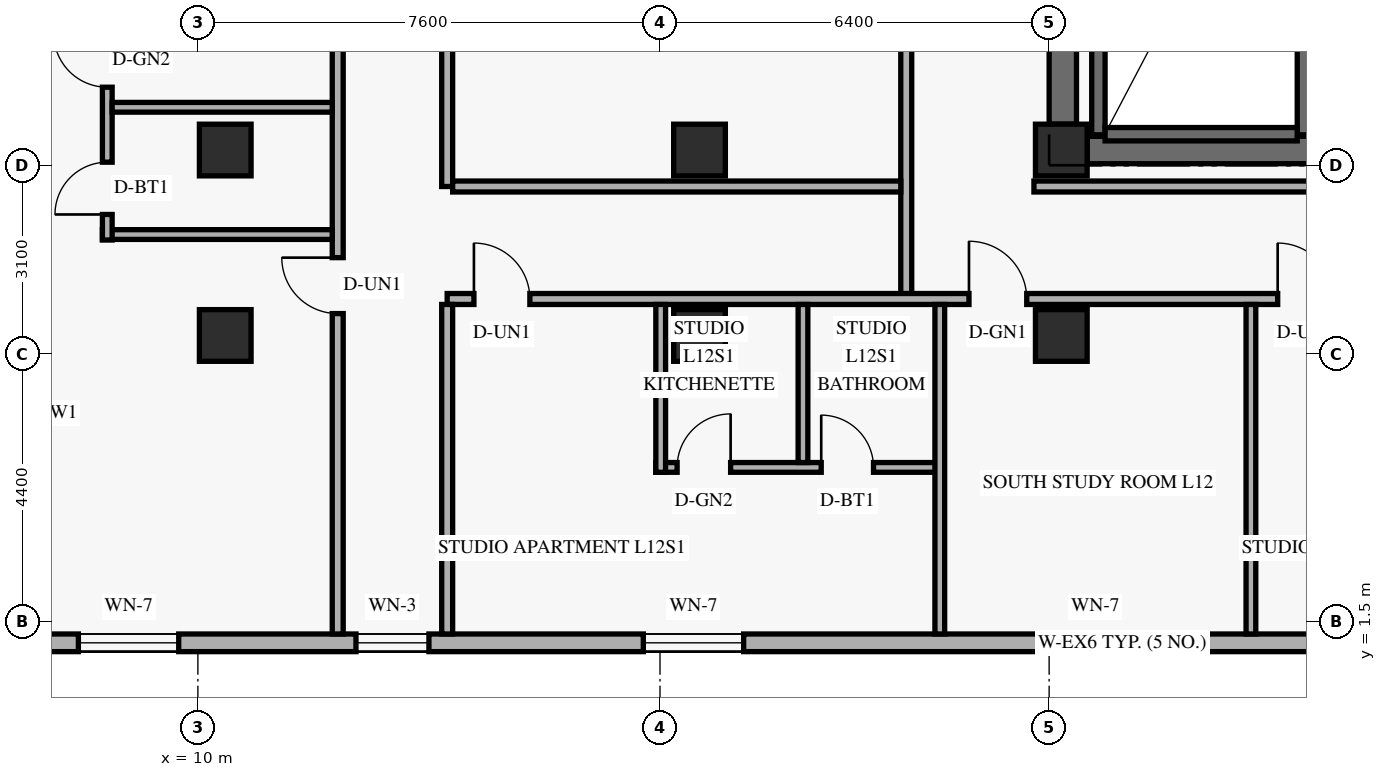
"""IFC4 building model, lengths in metres.
Left out: names, types, materials, properties, quantities, classifications, styles, units other than length and angle.
Written with IfcOpenShell. Run it as: python <this file> out.ifc"""

import sys

from ifc_helpers import new_model, si_unit, direction, frame, frame_2d, origin, origin_2d, place, context, subcontext, project, spatial, rectangle, extrude, element, fill, save


model = new_model("IFC4")
c1 = context("Model", 3, precision=1e-05, world=origin(), true_north=direction((0.0, 1.0)))
c2 = subcontext(c1, "Body", "Model", "MODEL_VIEW")
j1 = project(units=[si_unit("LENGTHUNIT", "METRE"), si_unit("PLANEANGLEUNIT", "RADIAN")], contexts=[c1])
p1 = place(None, origin())
s1 = spatial("IfcSite", under=j1, at=p1, CompositionType="ELEMENT")
p2 = place(p1, origin())
s2 = spatial("IfcBuilding", under=s1, at=p2, CompositionType="ELEMENT")
p3 = place(p2, frame((0.0, 0.0, 49.2)))
s3 = spatial("IfcBuildingStorey", under=s2, at=p3, CompositionType="ELEMENT", Elevation=49.2)
p4 = place(p3, frame((24.225, 9.675, 0.0), z_axis=(0.0, 0.0, 1.0), x_axis=(0.0, 1.0, 0.0)))
e1 = element("IfcWall", 1, at=p4, inside=s3, PredefinedType="SHEAR", context=c2, shape_type="SweptSolid", body=[
    extrude(rectangle(XDim=7.45, YDim=0.45, at=frame_2d((3.725, 0.0))), origin(), (0.0, 0.0, 1.0), 2.667),
])
p5 = place(p3, frame((24.625, 9.25, 0.0), z_axis=(0.0, 0.0, 1.0), x_axis=(1.0, 0.0, 0.0)))
e2 = element("IfcWall", 2, at=p5, inside=s3, PredefinedType="SHEAR", context=c2, shape_type="SweptSolid", body=[
    extrude(rectangle(XDim=10.15, YDim=0.45, at=frame_2d((5.075, 0.0))), origin(), (0.0, 0.0, 1.0), 3.36),
])
p6 = place(p3, frame((24.81, 9.5, 0.0), z_axis=(0.0, 0.0, 1.0), x_axis=(0.0, 1.0, 0.0)))
e3 = element("IfcWall", 3, at=p6, inside=s3, PredefinedType="SHEAR", context=c2, shape_type="SweptSolid", body=[
    extrude(rectangle(XDim=7.76, YDim=0.22, at=frame_2d((3.88, 0.0))), origin(), (0.0, 0.0, 1.0), 3.36),
])
p7 = place(p3, frame((28.23, 9.5, 0.0), z_axis=(0.0, 0.0, 1.0), x_axis=(0.0, 1.0, 0.0)))
e4 = element("IfcWall", 4, at=p7, inside=s3, PredefinedType="SHEAR", context=c2, shape_type="SweptSolid", body=[
    extrude(rectangle(XDim=7.76, YDim=0.3, at=frame_2d((3.88, 0.0))), origin(), (0.0, 0.0, 1.0), 3.36),
])
p8 = place(p3, frame((24.92, 9.51, 0.0), z_axis=(0.0, 0.0, 1.0), x_axis=(1.0, 0.0, 0.0)))
e5 = element("IfcWall", 5, at=p8, inside=s3, PredefinedType="SHEAR", context=c2, shape_type="SweptSolid", body=[
    extrude(rectangle(XDim=3.16, YDim=0.22, at=frame_2d((1.58, 0.0))), origin(), (0.0, 0.0, 1.0), 3.36),
])
for number, where, z_axis, x_axis in (
    (6, (10.45, 6.2, 0.0), (0.0, 0.0, 1.0), (1.0, 0.0, 0.0)),
    (7, (10.45, 9.25, 0.0), (0.0, 0.0, 1.0), (1.0, 0.0, 0.0)),
    (8, (18.25, 6.2, 0.0), (0.0, 0.0, 1.0), (1.0, 0.0, 0.0)),
    (9, (18.25, 9.25, 0.0), (0.0, 0.0, 1.0), (1.0, 0.0, 0.0)),
    (10, (24.2, 6.2, 0.0), (0.0, 0.0, 1.0), (1.0, 0.0, 0.0)),
    (11, (24.2, 9.25, 0.0), (0.0, 0.0, 1.0), (1.0, 0.0, 0.0)),
):
    element("IfcColumn", number, at=place(p3, frame(where, z_axis=z_axis, x_axis=x_axis)), inside=s3, PredefinedType="COLUMN", context=c2, shape_type="SweptSolid", body=[
        extrude(rectangle(XDim=0.85, YDim=0.85, at=origin_2d()), origin(), (0.0, 0.0, 1.0), 3.6),
    ])
p9 = place(p3, frame((5.42, 1.145, 0.0), z_axis=(0.0, 0.0, 1.0), x_axis=(1.0, 0.0, 0.0)))
e12 = element("IfcWall", 12, at=p9, inside=s3, PredefinedType="SOLIDWALL", context=c2, shape_type="SweptSolid", body=[
    extrude(rectangle(XDim=39.56, YDim=0.29, at=frame_2d((19.78, 0.0))), origin(), (0.0, 0.0, 1.0), 3.36),
])
p10 = place(p9, frame((2.615, 0.0, 0.85)))
e13 = element("IfcOpeningElement", 13, at=p10, cuts=e12, PredefinedType="OPENING", context=c2, shape_type="SweptSolid", body=[
    extrude(rectangle(XDim=1.65, YDim=1.6, at=frame_2d((0.825, 0.8))), frame((0.0, 0.155, 0.0), z_axis=(0.0, -1.0, 0.0), x_axis=(1.0, 0.0, 0.0)), (0.0, 0.0, 1.0), 0.31),
])
p11 = place(p9, frame((7.18, 0.0, 0.85)))
e14 = element("IfcOpeningElement", 14, at=p11, cuts=e12, PredefinedType="OPENING", context=c2, shape_type="SweptSolid", body=[
    extrude(rectangle(XDim=1.2, YDim=1.5, at=frame_2d((0.6, 0.75))), frame((0.0, 0.155, 0.0), z_axis=(0.0, -1.0, 0.0), x_axis=(1.0, 0.0, 0.0)), (0.0, 0.0, 1.0), 0.31),
])
p12 = place(p9, frame((11.906, 0.0, 0.85)))
e15 = element("IfcOpeningElement", 15, at=p12, cuts=e12, PredefinedType="OPENING", context=c2, shape_type="SweptSolid", body=[
    extrude(rectangle(XDim=1.65, YDim=1.6, at=frame_2d((0.825, 0.8))), frame((0.0, 0.155, 0.0), z_axis=(0.0, -1.0, 0.0), x_axis=(1.0, 0.0, 0.0)), (0.0, 0.0, 1.0), 0.31),
])
p13 = place(p9, frame((18.515, 0.0, 0.85)))
e16 = element("IfcOpeningElement", 16, at=p13, cuts=e12, PredefinedType="OPENING", context=c2, shape_type="SweptSolid", body=[
    extrude(rectangle(XDim=1.65, YDim=1.6, at=frame_2d((0.825, 0.8))), frame((0.0, 0.155, 0.0), z_axis=(0.0, -1.0, 0.0), x_axis=(1.0, 0.0, 0.0)), (0.0, 0.0, 1.0), 0.31),
])
p14 = place(p9, frame((25.124, 0.0, 0.85)))
e17 = element("IfcOpeningElement", 17, at=p14, cuts=e12, PredefinedType="OPENING", context=c2, shape_type="SweptSolid", body=[
    extrude(rectangle(XDim=1.65, YDim=1.6, at=frame_2d((0.825, 0.8))), frame((0.0, 0.155, 0.0), z_axis=(0.0, -1.0, 0.0), x_axis=(1.0, 0.0, 0.0)), (0.0, 0.0, 1.0), 0.31),
])
p15 = place(p9, frame((30.465, 0.0, 0.85)))
e18 = element("IfcOpeningElement", 18, at=p15, cuts=e12, PredefinedType="OPENING", context=c2, shape_type="SweptSolid", body=[
    extrude(rectangle(XDim=1.2, YDim=1.5, at=frame_2d((0.6, 0.75))), frame((0.0, 0.155, 0.0), z_axis=(0.0, -1.0, 0.0), x_axis=(1.0, 0.0, 0.0)), (0.0, 0.0, 1.0), 0.31),
])
p16 = place(p9, frame((32.613, 0.0, 0.85)))
e19 = element("IfcOpeningElement", 19, at=p16, cuts=e12, PredefinedType="OPENING", context=c2, shape_type="SweptSolid", body=[
    extrude(rectangle(XDim=1.65, YDim=1.6, at=frame_2d((0.825, 0.8))), frame((0.0, 0.155, 0.0), z_axis=(0.0, -1.0, 0.0), x_axis=(1.0, 0.0, 0.0)), (0.0, 0.0, 1.0), 0.31),
])
p17 = place(p9, frame((36.328, 0.0, 0.85)))
e20 = element("IfcOpeningElement", 20, at=p17, cuts=e12, PredefinedType="OPENING", context=c2, shape_type="SweptSolid", body=[
    extrude(rectangle(XDim=1.65, YDim=1.6, at=frame_2d((0.825, 0.8))), frame((0.0, 0.155, 0.0), z_axis=(0.0, -1.0, 0.0), x_axis=(1.0, 0.0, 0.0)), (0.0, 0.0, 1.0), 0.31),
])
p18 = place(p3, frame((21.65, 6.8, 0.0), z_axis=(0.0, 0.0, 1.0), x_axis=(0.0, 1.0, 0.0)))
e21 = element("IfcWall", 21, at=p18, inside=s3, PredefinedType="STANDARD", context=c2, shape_type="SweptSolid", body=[
    extrude(rectangle(XDim=34.4, YDim=0.18, at=frame_2d((17.2, 0.0))), origin(), (0.0, 0.0, 1.0), 2.649),
])
p19 = place(p3, frame((14.1, 6.8, 0.0), z_axis=(0.0, 0.0, 1.0), x_axis=(1.0, 0.0, 0.0)))
e22 = element("IfcWall", 22, at=p19, inside=s3, PredefinedType="STANDARD", context=c2, shape_type="SweptSolid", body=[
    extrude(rectangle(XDim=21.32, YDim=0.18, at=frame_2d((10.66, 0.0))), origin(), (0.0, 0.0, 1.0), 2.649),
])
p20 = place(p19, frame((0.44, 0.0, 0.0)))
e23 = element("IfcOpeningElement", 23, at=p20, cuts=e22, PredefinedType="OPENING", context=c2, shape_type="SweptSolid", body=[
    extrude(rectangle(XDim=0.92, YDim=2.15, at=frame_2d((0.46, 1.075))), frame((0.0, 0.1, 0.0), z_axis=(0.0, -1.0, 0.0), x_axis=(1.0, 0.0, 0.0)), (0.0, 0.0, 1.0), 0.2),
])
p21 = place(p19, frame((8.582, 0.0, 0.0)))
e24 = element("IfcOpeningElement", 24, at=p21, cuts=e22, PredefinedType="OPENING", context=c2, shape_type="SweptSolid", body=[
    extrude(rectangle(XDim=0.95, YDim=2.15, at=frame_2d((0.475, 1.075))), frame((0.0, 0.1, 0.0), z_axis=(0.0, -1.0, 0.0), x_axis=(1.0, 0.0, 0.0)), (0.0, 0.0, 1.0), 0.2),
])
p22 = place(p19, frame((13.658, 0.0, 0.0)))
e25 = element("IfcOpeningElement", 25, at=p22, cuts=e22, PredefinedType="OPENING", context=c2, shape_type="SweptSolid", body=[
    extrude(rectangle(XDim=0.92, YDim=2.15, at=frame_2d((0.46, 1.075))), frame((0.0, 0.1, 0.0), z_axis=(0.0, -1.0, 0.0), x_axis=(1.0, 0.0, 0.0)), (0.0, 0.0, 1.0), 0.2),
])
p23 = place(p3, frame((23.75, 8.65, 0.0), z_axis=(0.0, 0.0, 1.0), x_axis=(1.0, 0.0, 0.0)))
e26 = element("IfcWall", 26, at=p23, inside=s3, PredefinedType="STANDARD", context=c2, shape_type="SweptSolid", body=[
    extrude(rectangle(XDim=11.67, YDim=0.18, at=frame_2d((5.835, 0.0))), origin(), (0.0, 0.0, 1.0), 2.649),
])
p24 = place(p3, frame((12.3, 1.29, 0.0), z_axis=(0.0, 0.0, 1.0), x_axis=(0.0, 1.0, 0.0)))
e27 = element("IfcWall", 27, at=p24, inside=s3, PredefinedType="STANDARD", context=c2, shape_type="SweptSolid", body=[
    extrude(rectangle(XDim=45.42, YDim=0.18, at=frame_2d((22.71, 0.0))), origin(), (0.0, 0.0, 1.0), 2.649),
])
p25 = place(p24, frame((5.27, 0.0, 0.0)))
e28 = element("IfcOpeningElement", 28, at=p25, cuts=e27, PredefinedType="OPENING", context=c2, shape_type="SweptSolid", body=[
    extrude(rectangle(XDim=0.92, YDim=2.15, at=frame_2d((0.46, 1.075))), frame((0.0, 0.1, 0.0), z_axis=(0.0, -1.0, 0.0), x_axis=(1.0, 0.0, 0.0)), (0.0, 0.0, 1.0), 0.2),
])
p26 = place(p24, frame((16.21, 0.0, 0.0)))
e29 = element("IfcOpeningElement", 29, at=p26, cuts=e27, PredefinedType="OPENING", context=c2, shape_type="SweptSolid", body=[
    extrude(rectangle(XDim=0.92, YDim=2.15, at=frame_2d((0.46, 1.075))), frame((0.0, 0.1, 0.0), z_axis=(0.0, -1.0, 0.0), x_axis=(1.0, 0.0, 0.0)), (0.0, 0.0, 1.0), 0.2),
])
p27 = place(p24, frame((28.63, 0.0, 0.0)))
e30 = element("IfcOpeningElement", 30, at=p27, cuts=e27, PredefinedType="OPENING", context=c2, shape_type="SweptSolid", body=[
    extrude(rectangle(XDim=0.92, YDim=2.15, at=frame_2d((0.46, 1.075))), frame((0.0, 0.1, 0.0), z_axis=(0.0, -1.0, 0.0), x_axis=(1.0, 0.0, 0.0)), (0.0, 0.0, 1.0), 0.2),
])
p28 = place(p24, frame((40.59, 0.0, 0.0)))
e31 = element("IfcOpeningElement", 31, at=p28, cuts=e27, PredefinedType="OPENING", context=c2, shape_type="SweptSolid", body=[
    extrude(rectangle(XDim=0.92, YDim=2.15, at=frame_2d((0.46, 1.075))), frame((0.0, 0.1, 0.0), z_axis=(0.0, -1.0, 0.0), x_axis=(1.0, 0.0, 0.0)), (0.0, 0.0, 1.0), 0.2),
])
p29 = place(p3, frame((14.1, 8.65, 0.0), z_axis=(0.0, 0.0, 1.0), x_axis=(0.0, 1.0, 0.0)))
e32 = element("IfcWall", 32, at=p29, inside=s3, PredefinedType="STANDARD", context=c2, shape_type="SweptSolid", body=[
    extrude(rectangle(XDim=30.7, YDim=0.18, at=frame_2d((15.35, 0.0))), origin(), (0.0, 0.0, 1.0), 2.649),
])
p30 = place(p29, frame((7.35, 0.0, 0.0)))
e33 = element("IfcOpeningElement", 33, at=p30, cuts=e32, PredefinedType="OPENING", context=c2, shape_type="SweptSolid", body=[
    extrude(rectangle(XDim=0.9, YDim=2.1, at=frame_2d((0.45, 1.05))), frame((0.0, 0.1, 0.0), z_axis=(0.0, -1.0, 0.0), x_axis=(1.0, 0.0, 0.0)), (0.0, 0.0, 1.0), 0.2),
])
p31 = place(p29, frame((22.7, 0.0, 0.0)))
e34 = element("IfcOpeningElement", 34, at=p31, cuts=e32, PredefinedType="OPENING", context=c2, shape_type="SweptSolid", body=[
    extrude(rectangle(XDim=0.95, YDim=2.15, at=frame_2d((0.475, 1.075))), frame((0.0, 0.1, 0.0), z_axis=(0.0, -1.0, 0.0), x_axis=(1.0, 0.0, 0.0)), (0.0, 0.0, 1.0), 0.2),
])
p32 = place(p3, frame((14.19, 8.65, 0.0), z_axis=(0.0, 0.0, 1.0), x_axis=(1.0, 0.0, 0.0)))
e35 = element("IfcWall", 35, at=p32, inside=s3, PredefinedType="STANDARD", context=c2, shape_type="SweptSolid", body=[
    extrude(rectangle(XDim=7.37, YDim=0.18, at=frame_2d((3.685, 0.0))), origin(), (0.0, 0.0, 1.0), 2.649),
])
p33 = place(p3, frame((14.1, 1.29, 0.0), z_axis=(0.0, 0.0, 1.0), x_axis=(0.0, 1.0, 0.0)))
e36 = element("IfcWall", 36, at=p33, inside=s3, PredefinedType="PARTITIONING", context=c2, shape_type="SweptSolid", body=[
    extrude(rectangle(XDim=5.42, YDim=0.18, at=frame_2d((2.71, 0.0))), origin(), (0.0, 0.0, 1.0), 2.809),
])
p34 = place(p3, frame((8.43, 7.86, 0.0), z_axis=(0.0, 0.0, 1.0), x_axis=(1.0, 0.0, 0.0)))
e37 = element("IfcWall", 37, at=p34, inside=s3, PredefinedType="PLUMBINGWALL", context=c2, shape_type="SweptSolid", body=[
    extrude(rectangle(XDim=3.78, YDim=0.16, at=frame_2d((1.89, 0.0))), origin(), (0.0, 0.0, 1.0), 2.649),
])
p35 = place(p3, frame((8.51, 7.77, 0.0), z_axis=(0.0, 0.0, 1.0), x_axis=(0.0, 1.0, 0.0)))
e38 = element("IfcWall", 38, at=p35, inside=s3, PredefinedType="PLUMBINGWALL", context=c2, shape_type="SweptSolid", body=[
    extrude(rectangle(XDim=4.73, YDim=0.16, at=frame_2d((2.365, 0.0))), origin(), (0.0, 0.0, 1.0), 2.649),
])
p36 = place(p35, frame((0.42, 0.0, 0.0)))
e39 = element("IfcOpeningElement", 39, at=p36, cuts=e38, PredefinedType="OPENING", context=c2, shape_type="SweptSolid", body=[
    extrude(rectangle(XDim=0.86, YDim=2.12, at=frame_2d((0.43, 1.06))), frame((0.0, 0.09, 0.0), z_axis=(0.0, -1.0, 0.0), x_axis=(1.0, 0.0, 0.0)), (0.0, 0.0, 1.0), 0.18),
])
p37 = place(p35, frame((2.513, 0.0, 0.0)))
e40 = element("IfcOpeningElement", 40, at=p37, cuts=e38, PredefinedType="OPENING", context=c2, shape_type="SweptSolid", body=[
    extrude(rectangle(XDim=0.88, YDim=2.12, at=frame_2d((0.44, 1.06))), frame((0.0, 0.09, 0.0), z_axis=(0.0, -1.0, 0.0), x_axis=(1.0, 0.0, 0.0)), (0.0, 0.0, 1.0), 0.18),
])
p38 = place(p3, frame((8.59, 9.953, 0.0), z_axis=(0.0, 0.0, 1.0), x_axis=(1.0, 0.0, 0.0)))
e41 = element("IfcWall", 41, at=p38, inside=s3, PredefinedType="PLUMBINGWALL", context=c2, shape_type="SweptSolid", body=[
    extrude(rectangle(XDim=3.62, YDim=0.16, at=frame_2d((1.81, 0.0))), origin(), (0.0, 0.0, 1.0), 2.649),
])
p39 = place(p3, frame((17.531, 4.03, 0.0), z_axis=(0.0, 0.0, 1.0), x_axis=(1.0, 0.0, 0.0)))
e42 = element("IfcWall", 42, at=p39, inside=s3, PredefinedType="PLUMBINGWALL", context=c2, shape_type="SweptSolid", body=[
    extrude(rectangle(XDim=4.67, YDim=0.16, at=frame_2d((2.335, 0.0))), origin(), (0.0, 0.0, 1.0), 3.36),
])
p40 = place(p39, frame((0.35, 0.0, 0.0)))
e43 = element("IfcOpeningElement", 43, at=p40, cuts=e42, PredefinedType="OPENING", context=c2, shape_type="SweptSolid", body=[
    extrude(rectangle(XDim=0.88, YDim=2.12, at=frame_2d((0.44, 1.06))), frame((0.0, 0.09, 0.0), z_axis=(0.0, -1.0, 0.0), x_axis=(1.0, 0.0, 0.0)), (0.0, 0.0, 1.0), 0.18),
])
p41 = place(p39, frame((2.72, 0.0, 0.0)))
e44 = element("IfcOpeningElement", 44, at=p41, cuts=e42, PredefinedType="OPENING", context=c2, shape_type="SweptSolid", body=[
    extrude(rectangle(XDim=0.86, YDim=2.12, at=frame_2d((0.43, 1.06))), frame((0.0, 0.09, 0.0), z_axis=(0.0, -1.0, 0.0), x_axis=(1.0, 0.0, 0.0)), (0.0, 0.0, 1.0), 0.18),
])
p42 = place(p3, frame((17.612, 3.95, 0.0), z_axis=(0.0, 0.0, 1.0), x_axis=(0.0, 1.0, 0.0)))
e45 = element("IfcWall", 45, at=p42, inside=s3, PredefinedType="PLUMBINGWALL", context=c2, shape_type="SweptSolid", body=[
    extrude(rectangle(XDim=2.76, YDim=0.16, at=frame_2d((1.38, 0.0))), origin(), (0.0, 0.0, 1.0), 2.809),
])
p43 = place(p3, frame((19.952, 4.11, 0.0), z_axis=(0.0, 0.0, 1.0), x_axis=(0.0, 1.0, 0.0)))
e46 = element("IfcWall", 46, at=p43, inside=s3, PredefinedType="PLUMBINGWALL", context=c2, shape_type="SweptSolid", body=[
    extrude(rectangle(XDim=2.6, YDim=0.16, at=frame_2d((1.3, 0.0))), origin(), (0.0, 0.0, 1.0), 2.809),
])
for number, where, z_axis, x_axis in (
    (47, (22.202, 1.29, 0.0), (0.0, 0.0, 1.0), (0.0, 1.0, 0.0)),
    (48, (27.318, 1.29, 0.0), (0.0, 0.0, 1.0), (0.0, 1.0, 0.0)),
):
    element("IfcWall", number, at=place(p3, frame(where, z_axis=z_axis, x_axis=x_axis)), inside=s3, PredefinedType="PARTITIONING", context=c2, shape_type="SweptSolid", body=[
        extrude(rectangle(XDim=5.42, YDim=0.16, at=frame_2d((2.71, 0.0))), origin(), (0.0, 0.0, 1.0), 2.809),
    ])
p44 = place(p10, origin())
e49 = element("IfcWindow", 49, at=p44, inside=s3, PartitioningType="SINGLE_PANEL", PredefinedType="WINDOW", context=c2, shape_type="SweptSolid", body=[
    extrude(rectangle(XDim=1.65, YDim=1.6, at=frame_2d((0.825, 0.8))), frame((0.0, 0.03, 0.0), z_axis=(0.0, -1.0, 0.0), x_axis=(1.0, 0.0, 0.0)), (0.0, 0.0, 1.0), 0.06),
])
fill(e13, e49)
p45 = place(p11, origin())
e50 = element("IfcWindow", 50, at=p45, inside=s3, PartitioningType="SINGLE_PANEL", PredefinedType="WINDOW", context=c2, shape_type="SweptSolid", body=[
    extrude(rectangle(XDim=1.2, YDim=1.5, at=frame_2d((0.6, 0.75))), frame((0.0, 0.03, 0.0), z_axis=(0.0, -1.0, 0.0), x_axis=(1.0, 0.0, 0.0)), (0.0, 0.0, 1.0), 0.06),
])
fill(e14, e50)
p46 = place(p12, origin())
e51 = element("IfcWindow", 51, at=p46, inside=s3, PartitioningType="SINGLE_PANEL", PredefinedType="WINDOW", context=c2, shape_type="SweptSolid", body=[
    extrude(rectangle(XDim=1.65, YDim=1.6, at=frame_2d((0.825, 0.8))), frame((0.0, 0.03, 0.0), z_axis=(0.0, -1.0, 0.0), x_axis=(1.0, 0.0, 0.0)), (0.0, 0.0, 1.0), 0.06),
])
fill(e15, e51)
p47 = place(p13, origin())
e52 = element("IfcWindow", 52, at=p47, inside=s3, PartitioningType="SINGLE_PANEL", PredefinedType="WINDOW", context=c2, shape_type="SweptSolid", body=[
    extrude(rectangle(XDim=1.65, YDim=1.6, at=frame_2d((0.825, 0.8))), frame((0.0, 0.03, 0.0), z_axis=(0.0, -1.0, 0.0), x_axis=(1.0, 0.0, 0.0)), (0.0, 0.0, 1.0), 0.06),
])
fill(e16, e52)
p48 = place(p25, origin())
e53 = element("IfcDoor", 53, at=p48, inside=s3, OperationType="SINGLE_SWING_RIGHT", PredefinedType="DOOR", context=c2, shape_type="SweptSolid", body=[
    extrude(rectangle(XDim=0.92, YDim=2.15, at=frame_2d((0.46, 1.075))), frame((0.0, 0.025, 0.0), z_axis=(0.0, -1.0, 0.0), x_axis=(1.0, 0.0, 0.0)), (0.0, 0.0, 1.0), 0.05),
])
fill(e28, e53)
p49 = place(p36, origin())
e54 = element("IfcDoor", 54, at=p49, inside=s3, OperationType="SINGLE_SWING_LEFT", PredefinedType="DOOR", context=c2, shape_type="SweptSolid", body=[
    extrude(rectangle(XDim=0.86, YDim=2.12, at=frame_2d((0.43, 1.06))), frame((0.0, 0.025, 0.0), z_axis=(0.0, -1.0, 0.0), x_axis=(1.0, 0.0, 0.0)), (0.0, 0.0, 1.0), 0.05),
])
fill(e39, e54)
p50 = place(p37, origin())
e55 = element("IfcDoor", 55, at=p50, inside=s3, OperationType="SINGLE_SWING_RIGHT", PredefinedType="DOOR", context=c2, shape_type="SweptSolid", body=[
    extrude(rectangle(XDim=0.88, YDim=2.12, at=frame_2d((0.44, 1.06))), frame((0.0, 0.025, 0.0), z_axis=(0.0, -1.0, 0.0), x_axis=(1.0, 0.0, 0.0)), (0.0, 0.0, 1.0), 0.05),
])
fill(e40, e55)
p51 = place(p20, origin())
e56 = element("IfcDoor", 56, at=p51, inside=s3, OperationType="SINGLE_SWING_LEFT", PredefinedType="DOOR", context=c2, shape_type="SweptSolid", body=[
    extrude(rectangle(XDim=0.92, YDim=2.15, at=frame_2d((0.46, 1.075))), frame((0.0, 0.025, 0.0), z_axis=(0.0, -1.0, 0.0), x_axis=(1.0, 0.0, 0.0)), (0.0, 0.0, 1.0), 0.05),
])
fill(e23, e56)
p52 = place(p40, origin())
e57 = element("IfcDoor", 57, at=p52, inside=s3, OperationType="SINGLE_SWING_RIGHT", PredefinedType="DOOR", context=c2, shape_type="SweptSolid", body=[
    extrude(rectangle(XDim=0.88, YDim=2.12, at=frame_2d((0.44, 1.06))), frame((0.0, 0.025, 0.0), z_axis=(0.0, -1.0, 0.0), x_axis=(1.0, 0.0, 0.0)), (0.0, 0.0, 1.0), 0.05),
])
fill(e43, e57)
p53 = place(p41, origin())
e58 = element("IfcDoor", 58, at=p53, inside=s3, OperationType="SINGLE_SWING_LEFT", PredefinedType="DOOR", context=c2, shape_type="SweptSolid", body=[
    extrude(rectangle(XDim=0.86, YDim=2.12, at=frame_2d((0.43, 1.06))), frame((0.0, 0.025, 0.0), z_axis=(0.0, -1.0, 0.0), x_axis=(1.0, 0.0, 0.0)), (0.0, 0.0, 1.0), 0.05),
])
fill(e44, e58)
p54 = place(p21, origin())
e59 = element("IfcDoor", 59, at=p54, inside=s3, OperationType="SINGLE_SWING_LEFT", PredefinedType="DOOR", context=c2, shape_type="SweptSolid", body=[
    extrude(rectangle(XDim=0.95, YDim=2.15, at=frame_2d((0.475, 1.075))), frame((0.0, 0.025, 0.0), z_axis=(0.0, -1.0, 0.0), x_axis=(1.0, 0.0, 0.0)), (0.0, 0.0, 1.0), 0.05),
])
fill(e24, e59)
p55 = place(p22, origin())
e60 = element("IfcDoor", 60, at=p55, inside=s3, OperationType="SINGLE_SWING_LEFT", PredefinedType="DOOR", context=c2, shape_type="SweptSolid", body=[
    extrude(rectangle(XDim=0.92, YDim=2.15, at=frame_2d((0.46, 1.075))), frame((0.0, 0.025, 0.0), z_axis=(0.0, -1.0, 0.0), x_axis=(1.0, 0.0, 0.0)), (0.0, 0.0, 1.0), 0.05),
])
fill(e25, e60)
save(model, sys.argv[1])
